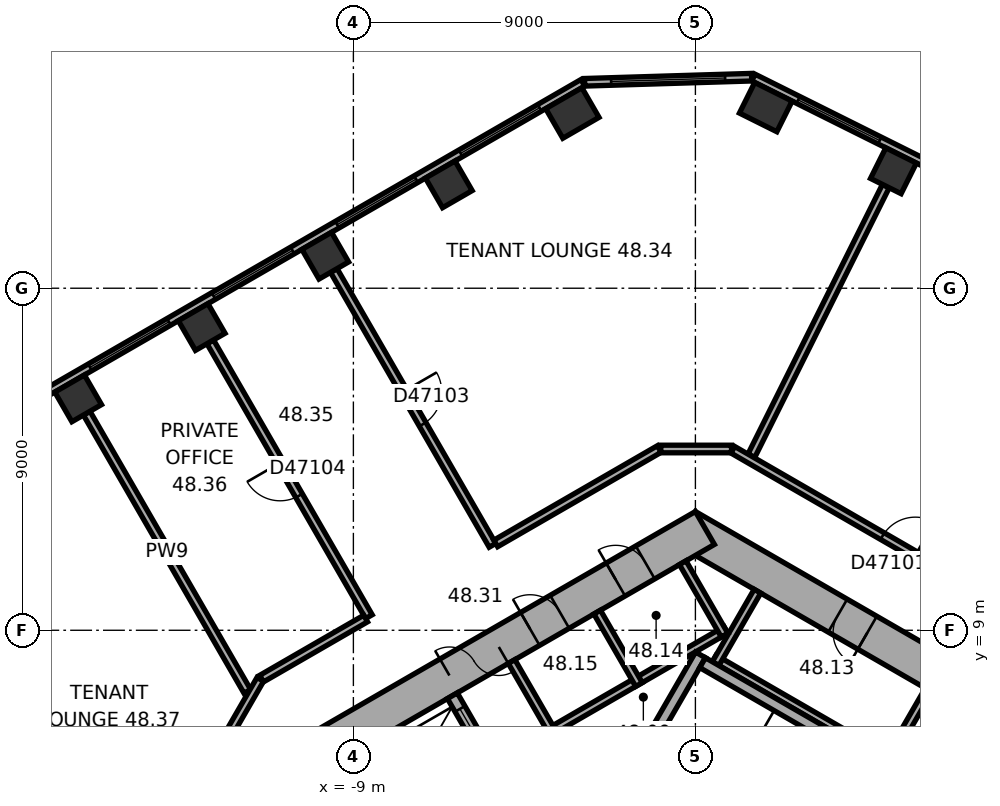
"""IFC4 building model, lengths in metres.
Left out: names, types, materials, properties, quantities, classifications, styles, units other than length and angle.
Written with IfcOpenShell. Run it as: python <this file> out.ifc"""

import sys

from ifc_helpers import new_model, si_unit, direction, frame, frame_2d, origin, origin_2d, place, context, subcontext, project, spatial, rectangle, extrude, element, fill, save


model = new_model("IFC4")
c1 = context("Model", 3, precision=1e-05, world=origin(), true_north=direction((0.0, 1.0)))
c2 = subcontext(c1, "Body", "Model", "MODEL_VIEW")
j1 = project(units=[si_unit("LENGTHUNIT", "METRE"), si_unit("PLANEANGLEUNIT", "RADIAN")], contexts=[c1])
p1 = place(None, origin())
s1 = spatial("IfcSite", under=j1, at=p1, CompositionType="ELEMENT")
p2 = place(p1, origin())
s2 = spatial("IfcBuilding", under=s1, at=p2, CompositionType="ELEMENT")
p3 = place(p2, frame((0.0, 0.0, 194.7)))
s3 = spatial("IfcBuildingStorey", under=s2, at=p3, CompositionType="ELEMENT", Elevation=194.7)
p4 = place(p3, frame((5.211, 21.091, 0.0), z_axis=(0.0, 0.0, 1.0), x_axis=(-0.894934361602, 0.44619781311, 0.0)))
e1 = element("IfcColumn", 1, at=p4, inside=s3, PredefinedType="COLUMN", context=c2, shape_type="SweptSolid", body=[
    extrude(rectangle(XDim=0.9, YDim=0.9, at=origin_2d()), origin(), (0.0, 0.0, 1.0), 3.7),
])
for number, where, z_axis, x_axis in (
    (2, (1.852, 22.766, 0.0), (0.0, 0.0, 1.0), (-0.895, 0.446, 0.0)),
    (3, (-3.238, 22.61, 0.0), (0.0, 0.0, 1.0), (-0.866, -0.5, 0.0)),
):
    element("IfcColumn", number, at=place(p3, frame(where, z_axis=z_axis, x_axis=x_axis)), inside=s3, PredefinedType="COLUMN", context=c2, shape_type="SweptSolid", body=[
        extrude(rectangle(XDim=1.1, YDim=0.9, at=origin_2d()), origin(), (0.0, 0.0, 1.0), 3.7),
    ])
for number, where, z_axis, x_axis in (
    (4, (-6.489, 20.733, 0.0), (0.0, 0.0, 1.0), (-0.866, -0.5, 0.0)),
    (5, (-9.74, 18.856, 0.0), (0.0, 0.0, 1.0), (-0.866, -0.5, 0.0)),
    (6, (-12.991, 16.979, 0.0), (0.0, 0.0, 1.0), (-0.866, -0.5, 0.0)),
    (7, (-16.242, 15.102, 0.0), (0.0, 0.0, 1.0), (-0.866, -0.5, 0.0)),
):
    element("IfcColumn", number, at=place(p3, frame(where, z_axis=z_axis, x_axis=x_axis)), inside=s3, PredefinedType="COLUMN", context=c2, shape_type="SweptSolid", body=[
        extrude(rectangle(XDim=0.9, YDim=0.9, at=origin_2d()), origin(), (0.0, 0.0, 1.0), 3.7),
    ])
p5 = place(p3, frame((10.25, 5.629, 0.0), z_axis=(0.0, 0.0, 1.0), x_axis=(-0.866022616891, 0.50000482701, 0.0)))
e8 = element("IfcWall", 8, at=p5, inside=s3, PredefinedType="SHEAR", context=c2, shape_type="SweptSolid", body=[
    extrude(rectangle(XDim=12.125, YDim=1.0, at=frame_2d((6.062, 0.0))), origin(), (0.0, 0.0, 1.0), 3.7),
])
p6 = place(p5, frame((2.712, 0.0, 0.0)))
e9 = element("IfcOpeningElement", 9, at=p6, cuts=e8, PredefinedType="OPENING", context=c2, shape_type="SweptSolid", body=[
    extrude(rectangle(XDim=0.9, YDim=2.1, at=frame_2d((0.45, 1.05))), frame((0.0, 0.51, 0.0), z_axis=(0.0, -1.0, 0.0), x_axis=(1.0, 0.0, 0.0)), (0.0, 0.0, 1.0), 1.02),
])
p7 = place(p5, frame((6.612, 0.0, 0.0)))
e10 = element("IfcOpeningElement", 10, at=p7, cuts=e8, PredefinedType="OPENING", context=c2, shape_type="SweptSolid", body=[
    extrude(rectangle(XDim=0.9, YDim=2.1, at=frame_2d((0.45, 1.05))), frame((0.0, 0.51, 0.0), z_axis=(0.0, -1.0, 0.0), x_axis=(1.0, 0.0, 0.0)), (0.0, 0.0, 1.0), 1.02),
])
p8 = place(p3, frame((0.25, 11.691, 0.0), z_axis=(0.0, 0.0, 1.0), x_axis=(-0.866022616891, -0.50000482701, 0.0)))
e11 = element("IfcWall", 11, at=p8, inside=s3, PredefinedType="SHEAR", context=c2, shape_type="SweptSolid", body=[
    extrude(rectangle(XDim=12.125, YDim=1.0, at=frame_2d((6.062, 0.0))), origin(), (0.0, 0.0, 1.0), 3.7),
])
p9 = place(p8, frame((6.262, 0.0, 0.0)))
e12 = element("IfcOpeningElement", 12, at=p9, cuts=e11, PredefinedType="OPENING", context=c2, shape_type="SweptSolid", body=[
    extrude(rectangle(XDim=1.5, YDim=2.1, at=frame_2d((0.75, 1.05))), frame((0.0, 0.51, 0.0), z_axis=(0.0, -1.0, 0.0), x_axis=(1.0, 0.0, 0.0)), (0.0, 0.0, 1.0), 1.02),
])
p10 = place(p8, frame((1.812, 0.0, 0.0)))
e13 = element("IfcOpeningElement", 13, at=p10, cuts=e11, PredefinedType="OPENING", context=c2, shape_type="SweptSolid", body=[
    extrude(rectangle(XDim=0.9, YDim=2.1, at=frame_2d((0.45, 1.05))), frame((0.0, 0.51, 0.0), z_axis=(0.0, -1.0, 0.0), x_axis=(1.0, 0.0, 0.0)), (0.0, 0.0, 1.0), 1.02),
])
p11 = place(p8, frame((4.412, 0.0, 0.0)))
e14 = element("IfcOpeningElement", 14, at=p11, cuts=e11, PredefinedType="OPENING", context=c2, shape_type="SweptSolid", body=[
    extrude(rectangle(XDim=0.9, YDim=2.1, at=frame_2d((0.45, 1.05))), frame((0.0, 0.51, 0.0), z_axis=(0.0, -1.0, 0.0), x_axis=(1.0, 0.0, 0.0)), (0.0, 0.0, 1.0), 1.02),
])
p12 = place(p3, frame((19.464, 14.599, 0.0), z_axis=(0.0, 0.0, 1.0), x_axis=(-0.894935755043, 0.446195018289, 0.0)))
e15 = element("IfcWall", 15, at=p12, inside=s3, PredefinedType="STANDARD", context=c2, shape_type="SweptSolid", body=[
    extrude(rectangle(XDim=20.044, YDim=0.2, at=frame_2d((10.022, 0.0))), origin(), (0.0, 0.0, 1.0), 3.7),
])
p13 = place(p12, frame((1.313, 0.0, 0.9)))
e16 = element("IfcOpeningElement", 16, at=p13, cuts=e15, PredefinedType="OPENING", context=c2, shape_type="SweptSolid", body=[
    extrude(rectangle(XDim=2.4, YDim=2.0, at=frame_2d((1.2, 1.0))), frame((0.0, 0.11, 0.0), z_axis=(0.0, -1.0, 0.0), x_axis=(1.0, 0.0, 0.0)), (0.0, 0.0, 1.0), 0.22),
])
p14 = place(p12, frame((5.067, 0.0, 0.9)))
e17 = element("IfcOpeningElement", 17, at=p14, cuts=e15, PredefinedType="OPENING", context=c2, shape_type="SweptSolid", body=[
    extrude(rectangle(XDim=2.4, YDim=2.0, at=frame_2d((1.2, 1.0))), frame((0.0, 0.11, 0.0), z_axis=(0.0, -1.0, 0.0), x_axis=(1.0, 0.0, 0.0)), (0.0, 0.0, 1.0), 0.22),
])
p15 = place(p12, frame((8.821, 0.0, 0.9)))
e18 = element("IfcOpeningElement", 18, at=p15, cuts=e15, PredefinedType="OPENING", context=c2, shape_type="SweptSolid", body=[
    extrude(rectangle(XDim=2.4, YDim=2.0, at=frame_2d((1.2, 1.0))), frame((0.0, 0.11, 0.0), z_axis=(0.0, -1.0, 0.0), x_axis=(1.0, 0.0, 0.0)), (0.0, 0.0, 1.0), 0.22),
])
p16 = place(p12, frame((12.575, 0.0, 0.9)))
e19 = element("IfcOpeningElement", 19, at=p16, cuts=e15, PredefinedType="OPENING", context=c2, shape_type="SweptSolid", body=[
    extrude(rectangle(XDim=2.4, YDim=2.0, at=frame_2d((1.2, 1.0))), frame((0.0, 0.11, 0.0), z_axis=(0.0, -1.0, 0.0), x_axis=(1.0, 0.0, 0.0)), (0.0, 0.0, 1.0), 0.22),
])
p17 = place(p12, frame((16.329, 0.0, 0.9)))
e20 = element("IfcOpeningElement", 20, at=p17, cuts=e15, PredefinedType="OPENING", context=c2, shape_type="SweptSolid", body=[
    extrude(rectangle(XDim=2.4, YDim=2.0, at=frame_2d((1.2, 1.0))), frame((0.0, 0.11, 0.0), z_axis=(0.0, -1.0, 0.0), x_axis=(1.0, 0.0, 0.0)), (0.0, 0.0, 1.0), 0.22),
])
p18 = place(p3, frame((1.479, 23.553, 0.0), z_axis=(0.0, 0.0, 1.0), x_axis=(-0.999534786117, -0.03049936625, 0.0)))
e21 = element("IfcWall", 21, at=p18, inside=s3, PredefinedType="STANDARD", context=c2, shape_type="SweptSolid", body=[
    extrude(rectangle(XDim=4.395, YDim=0.2, at=frame_2d((2.197, 0.0))), origin(), (0.0, 0.0, 1.0), 3.7),
])
p19 = place(p18, frame((0.698, 0.0, 0.9)))
e22 = element("IfcOpeningElement", 22, at=p19, cuts=e21, PredefinedType="OPENING", context=c2, shape_type="SweptSolid", body=[
    extrude(rectangle(XDim=3.0, YDim=2.0, at=frame_2d((1.5, 1.0))), frame((0.0, 0.11, 0.0), z_axis=(0.0, -1.0, 0.0), x_axis=(1.0, 0.0, 0.0)), (0.0, 0.0, 1.0), 0.22),
])
p20 = place(p3, frame((-2.961, 23.405, 0.0), z_axis=(0.0, 0.0, 1.0), x_axis=(-0.866023315909, -0.500003616288, 0.0)))
e23 = element("IfcWall", 23, at=p20, inside=s3, PredefinedType="STANDARD", context=c2, shape_type="SweptSolid", body=[
    extrude(rectangle(XDim=20.044, YDim=0.2, at=frame_2d((10.022, 0.0))), origin(), (0.0, 0.0, 1.0), 3.7),
])
p21 = place(p20, frame((1.314, 0.0, 0.9)))
e24 = element("IfcOpeningElement", 24, at=p21, cuts=e23, PredefinedType="OPENING", context=c2, shape_type="SweptSolid", body=[
    extrude(rectangle(XDim=2.4, YDim=2.0, at=frame_2d((1.2, 1.0))), frame((0.0, 0.11, 0.0), z_axis=(0.0, -1.0, 0.0), x_axis=(1.0, 0.0, 0.0)), (0.0, 0.0, 1.0), 0.22),
])
p22 = place(p20, frame((5.069, 0.0, 0.9)))
e25 = element("IfcOpeningElement", 25, at=p22, cuts=e23, PredefinedType="OPENING", context=c2, shape_type="SweptSolid", body=[
    extrude(rectangle(XDim=2.4, YDim=2.0, at=frame_2d((1.2, 1.0))), frame((0.0, 0.11, 0.0), z_axis=(0.0, -1.0, 0.0), x_axis=(1.0, 0.0, 0.0)), (0.0, 0.0, 1.0), 0.22),
])
p23 = place(p20, frame((8.823, 0.0, 0.9)))
e26 = element("IfcOpeningElement", 26, at=p23, cuts=e23, PredefinedType="OPENING", context=c2, shape_type="SweptSolid", body=[
    extrude(rectangle(XDim=2.4, YDim=2.0, at=frame_2d((1.2, 1.0))), frame((0.0, 0.11, 0.0), z_axis=(0.0, -1.0, 0.0), x_axis=(1.0, 0.0, 0.0)), (0.0, 0.0, 1.0), 0.22),
])
p24 = place(p20, frame((12.577, 0.0, 0.9)))
e27 = element("IfcOpeningElement", 27, at=p24, cuts=e23, PredefinedType="OPENING", context=c2, shape_type="SweptSolid", body=[
    extrude(rectangle(XDim=2.4, YDim=2.0, at=frame_2d((1.2, 1.0))), frame((0.0, 0.11, 0.0), z_axis=(0.0, -1.0, 0.0), x_axis=(1.0, 0.0, 0.0)), (0.0, 0.0, 1.0), 0.22),
])
p25 = place(p20, frame((16.331, 0.0, 0.9)))
e28 = element("IfcOpeningElement", 28, at=p25, cuts=e23, PredefinedType="OPENING", context=c2, shape_type="SweptSolid", body=[
    extrude(rectangle(XDim=2.4, YDim=2.0, at=frame_2d((1.2, 1.0))), frame((0.0, 0.11, 0.0), z_axis=(0.0, -1.0, 0.0), x_axis=(1.0, 0.0, 0.0)), (0.0, 0.0, 1.0), 0.22),
])
p26 = place(p3, frame((7.424, 4.259, 0.0), z_axis=(0.0, 0.0, 1.0), x_axis=(-0.866026010844, 0.49999894854, 0.0)))
e29 = element("IfcWall", 29, at=p26, inside=s3, PredefinedType="PARTITIONING", context=c2, shape_type="SweptSolid", body=[
    extrude(rectangle(XDim=8.0, YDim=0.2, at=frame_2d((4.0, 0.0))), origin(), (0.0, 0.0, 1.0), 3.42),
])
for number, where, z_axis, x_axis in (
    (30, (5.036, 5.522, 0.0), (0.0, 0.0, 1.0), (0.5, 0.866, 0.0)),
    (31, (0.532, 8.122, 0.0), (0.0, 0.0, 1.0), (0.5, 0.866, 0.0)),
):
    element("IfcWall", number, at=place(p3, frame(where, z_axis=z_axis, x_axis=x_axis)), inside=s3, PredefinedType="PARTITIONING", context=c2, shape_type="SweptSolid", body=[
        extrude(rectangle(XDim=2.2, YDim=0.2, at=frame_2d((1.1, 0.0))), origin(), (0.0, 0.0, 1.0), 3.42),
    ])
p27 = place(p3, frame((0.803, 9.009, 0.0), z_axis=(0.0, 0.0, 1.0), x_axis=(-0.866028230842, -0.499995103361, 0.0)))
e32 = element("IfcWall", 32, at=p27, inside=s3, PredefinedType="PARTITIONING", context=c2, shape_type="SweptSolid", body=[
    extrude(rectangle(XDim=5.4, YDim=0.2, at=frame_2d((2.7, 0.0))), origin(), (0.0, 0.0, 1.0), 3.42),
])
p28 = place(p3, frame((0.767, 8.872, 0.0), z_axis=(0.0, 0.0, 1.0), x_axis=(-0.499994660107, 0.866028486751, 0.0)))
e33 = element("IfcWall", 33, at=p28, inside=s3, PredefinedType="PARTITIONING", context=c2, shape_type="SweptSolid", body=[
    extrude(rectangle(XDim=2.2, YDim=0.2, at=frame_2d((1.1, 0.0))), origin(), (0.0, 0.0, 1.0), 3.42),
])
for number, where, z_axis, x_axis in (
    (34, (-1.485, 7.572, 0.0), (0.0, 0.0, 1.0), (-0.5, 0.866, 0.0)),
    (35, (-3.737, 6.272, 0.0), (0.0, 0.0, 1.0), (-0.5, 0.866, 0.0)),
):
    element("IfcWall", number, at=place(p3, frame(where, z_axis=z_axis, x_axis=x_axis)), inside=s3, PredefinedType="PARTITIONING", context=c2, shape_type="SweptSolid", body=[
        extrude(rectangle(XDim=2.2, YDim=0.2, at=frame_2d((1.1, 0.0))), origin(), (0.0, 0.0, 1.0), 3.42),
    ])
p29 = place(p3, frame((-2.216, 4.282, 0.0), z_axis=(0.0, 0.0, 1.0), x_axis=(0.499977259774, 0.866038532462, 0.0)))
e36 = element("IfcWall", 36, at=p29, inside=s3, PredefinedType="SHEAR", context=c2, shape_type="SweptSolid", body=[
    extrude(rectangle(XDim=4.7, YDim=0.3, at=frame_2d((2.35, 0.0))), origin(), (0.0, 0.0, 1.0), 3.42),
])
p30 = place(p3, frame((6.303, 4.617, 0.0), z_axis=(0.0, 0.0, 1.0), x_axis=(-0.866027801685, 0.499995846692, 0.0)))
e37 = element("IfcWall", 37, at=p30, inside=s3, PredefinedType="SHEAR", context=c2, shape_type="SweptSolid", body=[
    extrude(rectangle(XDim=7.06, YDim=0.3, at=frame_2d((3.53, 0.0))), origin(), (0.0, 0.0, 1.0), 3.42),
])
p31 = place(p3, frame((-5.295, 5.372, 0.0), z_axis=(0.0, 0.0, 1.0), x_axis=(-0.500077893725, 0.86598042715, 0.0)))
e38 = element("IfcWall", 38, at=p31, inside=s3, PredefinedType="SHEAR", context=c2, shape_type="SweptSolid", body=[
    extrude(rectangle(XDim=2.2, YDim=0.3, at=frame_2d((1.1, 0.0))), origin(), (0.0, 0.0, 1.0), 3.42),
])
p32 = place(p31, frame((0.7, 0.0, 0.0)))
e39 = element("IfcOpeningElement", 39, at=p32, cuts=e38, PredefinedType="OPENING", context=c2, shape_type="SweptSolid", body=[
    extrude(rectangle(XDim=1.1, YDim=2.1, at=frame_2d((0.55, 1.05))), frame((0.0, 0.16, 0.0), z_axis=(0.0, -1.0, 0.0), x_axis=(1.0, 0.0, 0.0)), (0.0, 0.0, 1.0), 0.32),
])
p33 = place(p3, frame((-16.018, 14.712, 0.0), z_axis=(0.0, 0.0, 1.0), x_axis=(0.500000843414, -0.866024916838, 0.0)))
e40 = element("IfcWall", 40, at=p33, inside=s3, PredefinedType="PARTITIONING", context=c2, shape_type="SweptSolid", body=[
    extrude(rectangle(XDim=8.452, YDim=0.2, at=frame_2d((4.226, 0.0))), origin(), (0.0, 0.0, 1.0), 3.42),
])
p34 = place(p3, frame((-12.766, 16.589, 0.0), z_axis=(0.0, 0.0, 1.0), x_axis=(0.500010139422, -0.866019549707, 0.0)))
e41 = element("IfcWall", 41, at=p34, inside=s3, PredefinedType="PARTITIONING", context=c2, shape_type="SweptSolid", body=[
    extrude(rectangle(XDim=8.35, YDim=0.2, at=frame_2d((4.175, 0.0))), origin(), (0.0, 0.0, 1.0), 3.42),
])
p35 = place(p34, frame((3.675, 0.0, 0.0)))
e42 = element("IfcOpeningElement", 42, at=p35, cuts=e41, PredefinedType="OPENING", context=c2, shape_type="SweptSolid", body=[
    extrude(rectangle(XDim=1.0, YDim=2.1, at=frame_2d((0.5, 1.05))), frame((0.0, 0.11, 0.0), z_axis=(0.0, -1.0, 0.0), x_axis=(1.0, 0.0, 0.0)), (0.0, 0.0, 1.0), 0.22),
])
p36 = place(p3, frame((-11.45, 7.708, 0.0), z_axis=(0.0, 0.0, 1.0), x_axis=(-0.499964847546, -0.866045698112, 0.0)))
e43 = element("IfcWall", 43, at=p36, inside=s3, PredefinedType="PARTITIONING", context=c2, shape_type="SweptSolid", body=[
    extrude(rectangle(XDim=1.86, YDim=0.2, at=frame_2d((0.93, 0.0))), origin(), (0.0, 0.0, 1.0), 3.42),
])
p37 = place(p3, frame((-9.515, 18.466, 0.0), z_axis=(0.0, 0.0, 1.0), x_axis=(0.500010139422, -0.866019549707, 0.0)))
e44 = element("IfcWall", 44, at=p37, inside=s3, PredefinedType="PARTITIONING", context=c2, shape_type="SweptSolid", body=[
    extrude(rectangle(XDim=8.35, YDim=0.2, at=frame_2d((4.175, 0.0))), origin(), (0.0, 0.0, 1.0), 2.87),
])
p38 = place(p37, frame((3.675, 0.0, 0.0)))
e45 = element("IfcOpeningElement", 45, at=p38, cuts=e44, PredefinedType="OPENING", context=c2, shape_type="SweptSolid", body=[
    extrude(rectangle(XDim=1.0, YDim=2.1, at=frame_2d((0.5, 1.05))), frame((0.0, 0.11, 0.0), z_axis=(0.0, -1.0, 0.0), x_axis=(1.0, 0.0, 0.0)), (0.0, 0.0, 1.0), 0.22),
])
p39 = place(p3, frame((-8.678, 9.308, 0.0), z_axis=(0.0, 0.0, 1.0), x_axis=(-0.866000359435, -0.500043375578, 0.0)))
e46 = element("IfcWall", 46, at=p39, inside=s3, PredefinedType="PARTITIONING", context=c2, shape_type="SweptSolid", body=[
    extrude(rectangle(XDim=3.161, YDim=0.2, at=frame_2d((1.581, 0.0))), origin(), (0.0, 0.0, 1.0), 3.42),
])
p40 = place(p3, frame((-0.95, 13.77, 0.0), z_axis=(0.0, 0.0, 1.0), x_axis=(-0.866036689987, -0.499980451214, 0.0)))
e47 = element("IfcWall", 47, at=p40, inside=s3, PredefinedType="PARTITIONING", context=c2, shape_type="SweptSolid", body=[
    extrude(rectangle(XDim=4.969, YDim=0.2, at=frame_2d((2.485, 0.0))), origin(), (0.0, 0.0, 1.0), 3.42),
])
p41 = place(p3, frame((0.95, 13.77, 0.0), z_axis=(0.0, 0.0, 1.0), x_axis=(-1.0, 0.0, 0.0)))
e48 = element("IfcWall", 48, at=p41, inside=s3, PredefinedType="PARTITIONING", context=c2, shape_type="SweptSolid", body=[
    extrude(rectangle(XDim=1.86, YDim=0.2, at=frame_2d((0.93, 0.0))), origin(), (0.0, 0.0, 1.0), 3.42),
])
p42 = place(p3, frame((5.01, 20.688, 0.0), z_axis=(0.0, 0.0, 1.0), x_axis=(-0.446203062394, -0.894931744386, 0.0)))
e49 = element("IfcWall", 49, at=p42, inside=s3, PredefinedType="PARTITIONING", context=c2, shape_type="SweptSolid", body=[
    extrude(rectangle(XDim=7.927, YDim=0.2, at=frame_2d((3.963, 0.0))), origin(), (0.0, 0.0, 1.0), 2.87),
])
p43 = place(p3, frame((11.233, 7.833, 0.0), z_axis=(0.0, 0.0, 1.0), x_axis=(-0.866021713988, 0.50000639086, 0.0)))
e50 = element("IfcWall", 50, at=p43, inside=s3, PredefinedType="PARTITIONING", context=c2, shape_type="SweptSolid", body=[
    extrude(rectangle(XDim=11.834, YDim=0.2, at=frame_2d((5.917, 0.0))), origin(), (0.0, 0.0, 1.0), 3.42),
])
p44 = place(p43, frame((6.288, 0.0, 0.0)))
e51 = element("IfcOpeningElement", 51, at=p44, cuts=e50, PredefinedType="OPENING", context=c2, shape_type="SweptSolid", body=[
    extrude(rectangle(XDim=1.0, YDim=2.1, at=frame_2d((0.5, 1.05))), frame((0.0, 0.11, 0.0), z_axis=(0.0, -1.0, 0.0), x_axis=(1.0, 0.0, 0.0)), (0.0, 0.0, 1.0), 0.22),
])
p45 = place(p17, origin())
e52 = element("IfcWindow", 52, at=p45, inside=s3, PartitioningType="SINGLE_PANEL", PredefinedType="WINDOW", context=c2, shape_type="SweptSolid", body=[
    extrude(rectangle(XDim=2.4, YDim=2.0, at=frame_2d((1.2, 1.0))), frame((0.0, 0.03, 0.0), z_axis=(0.0, -1.0, 0.0), x_axis=(1.0, 0.0, 0.0)), (0.0, 0.0, 1.0), 0.06),
])
fill(e20, e52)
p46 = place(p19, origin())
e53 = element("IfcWindow", 53, at=p46, inside=s3, PartitioningType="SINGLE_PANEL", PredefinedType="WINDOW", context=c2, shape_type="SweptSolid", body=[
    extrude(rectangle(XDim=3.0, YDim=2.0, at=frame_2d((1.5, 1.0))), frame((0.0, 0.03, 0.0), z_axis=(0.0, -1.0, 0.0), x_axis=(1.0, 0.0, 0.0)), (0.0, 0.0, 1.0), 0.06),
])
fill(e22, e53)
p47 = place(p21, origin())
e54 = element("IfcWindow", 54, at=p47, inside=s3, PartitioningType="SINGLE_PANEL", PredefinedType="WINDOW", context=c2, shape_type="SweptSolid", body=[
    extrude(rectangle(XDim=2.4, YDim=2.0, at=frame_2d((1.2, 1.0))), frame((0.0, 0.03, 0.0), z_axis=(0.0, -1.0, 0.0), x_axis=(1.0, 0.0, 0.0)), (0.0, 0.0, 1.0), 0.06),
])
fill(e24, e54)
p48 = place(p22, origin())
e55 = element("IfcWindow", 55, at=p48, inside=s3, PartitioningType="SINGLE_PANEL", PredefinedType="WINDOW", context=c2, shape_type="SweptSolid", body=[
    extrude(rectangle(XDim=2.4, YDim=2.0, at=frame_2d((1.2, 1.0))), frame((0.0, 0.03, 0.0), z_axis=(0.0, -1.0, 0.0), x_axis=(1.0, 0.0, 0.0)), (0.0, 0.0, 1.0), 0.06),
])
fill(e25, e55)
p49 = place(p23, origin())
e56 = element("IfcWindow", 56, at=p49, inside=s3, PartitioningType="SINGLE_PANEL", PredefinedType="WINDOW", context=c2, shape_type="SweptSolid", body=[
    extrude(rectangle(XDim=2.4, YDim=2.0, at=frame_2d((1.2, 1.0))), frame((0.0, 0.03, 0.0), z_axis=(0.0, -1.0, 0.0), x_axis=(1.0, 0.0, 0.0)), (0.0, 0.0, 1.0), 0.06),
])
fill(e26, e56)
p50 = place(p24, origin())
e57 = element("IfcWindow", 57, at=p50, inside=s3, PartitioningType="SINGLE_PANEL", PredefinedType="WINDOW", context=c2, shape_type="SweptSolid", body=[
    extrude(rectangle(XDim=2.4, YDim=2.0, at=frame_2d((1.2, 1.0))), frame((0.0, 0.03, 0.0), z_axis=(0.0, -1.0, 0.0), x_axis=(1.0, 0.0, 0.0)), (0.0, 0.0, 1.0), 0.06),
])
fill(e27, e57)
p51 = place(p9, origin())
e58 = element("IfcDoor", 58, at=p51, inside=s3, OperationType="DOUBLE_DOOR_SINGLE_SWING", PredefinedType="DOOR", context=c2, shape_type="SweptSolid", body=[
    extrude(rectangle(XDim=1.5, YDim=2.1, at=frame_2d((0.75, 1.05))), frame((0.0, 0.025, 0.0), z_axis=(0.0, -1.0, 0.0), x_axis=(1.0, 0.0, 0.0)), (0.0, 0.0, 1.0), 0.05),
])
fill(e12, e58)
p52 = place(p7, origin())
e59 = element("IfcDoor", 59, at=p52, inside=s3, OperationType="SINGLE_SWING_LEFT", PredefinedType="DOOR", context=c2, shape_type="SweptSolid", body=[
    extrude(rectangle(XDim=0.9, YDim=2.1, at=frame_2d((0.45, 1.05))), frame((0.0, 0.025, 0.0), z_axis=(0.0, -1.0, 0.0), x_axis=(1.0, 0.0, 0.0)), (0.0, 0.0, 1.0), 0.05),
])
fill(e10, e59)
p53 = place(p10, origin())
e60 = element("IfcDoor", 60, at=p53, inside=s3, OperationType="SINGLE_SWING_LEFT", PredefinedType="DOOR", context=c2, shape_type="SweptSolid", body=[
    extrude(rectangle(XDim=0.9, YDim=2.1, at=frame_2d((0.45, 1.05))), frame((0.0, 0.025, 0.0), z_axis=(0.0, -1.0, 0.0), x_axis=(1.0, 0.0, 0.0)), (0.0, 0.0, 1.0), 0.05),
])
fill(e13, e60)
p54 = place(p11, origin())
e61 = element("IfcDoor", 61, at=p54, inside=s3, OperationType="SINGLE_SWING_LEFT", PredefinedType="DOOR", context=c2, shape_type="SweptSolid", body=[
    extrude(rectangle(XDim=0.9, YDim=2.1, at=frame_2d((0.45, 1.05))), frame((0.0, 0.025, 0.0), z_axis=(0.0, -1.0, 0.0), x_axis=(1.0, 0.0, 0.0)), (0.0, 0.0, 1.0), 0.05),
])
fill(e14, e61)
p55 = place(p32, origin())
e62 = element("IfcDoor", 62, at=p55, inside=s3, OperationType="DOUBLE_DOOR_SLIDING", PredefinedType="DOOR", context=c2, shape_type="SweptSolid", body=[
    extrude(rectangle(XDim=1.1, YDim=2.1, at=frame_2d((0.55, 1.05))), frame((0.0, 0.025, 0.0), z_axis=(0.0, -1.0, 0.0), x_axis=(1.0, 0.0, 0.0)), (0.0, 0.0, 1.0), 0.05),
])
fill(e39, e62)
p56 = place(p44, origin())
e63 = element("IfcDoor", 63, at=p56, inside=s3, OperationType="SINGLE_SWING_LEFT", PredefinedType="DOOR", context=c2, shape_type="SweptSolid", body=[
    extrude(rectangle(XDim=1.0, YDim=2.1, at=frame_2d((0.5, 1.05))), frame((0.0, 0.025, 0.0), z_axis=(0.0, -1.0, 0.0), x_axis=(1.0, 0.0, 0.0)), (0.0, 0.0, 1.0), 0.05),
])
fill(e51, e63)
p57 = place(p38, origin())
e64 = element("IfcDoor", 64, at=p57, inside=s3, OperationType="SINGLE_SWING_LEFT", PredefinedType="DOOR", context=c2, shape_type="SweptSolid", body=[
    extrude(rectangle(XDim=1.0, YDim=2.1, at=frame_2d((0.5, 1.05))), frame((0.0, 0.025, 0.0), z_axis=(0.0, -1.0, 0.0), x_axis=(1.0, 0.0, 0.0)), (0.0, 0.0, 1.0), 0.05),
])
fill(e45, e64)
p58 = place(p35, origin())
e65 = element("IfcDoor", 65, at=p58, inside=s3, OperationType="SINGLE_SWING_LEFT", PredefinedType="DOOR", context=c2, shape_type="SweptSolid", body=[
    extrude(rectangle(XDim=1.0, YDim=2.1, at=frame_2d((0.5, 1.05))), frame((0.0, 0.025, 0.0), z_axis=(0.0, -1.0, 0.0), x_axis=(1.0, 0.0, 0.0)), (0.0, 0.0, 1.0), 0.05),
])
fill(e42, e65)
save(model, sys.argv[1])
